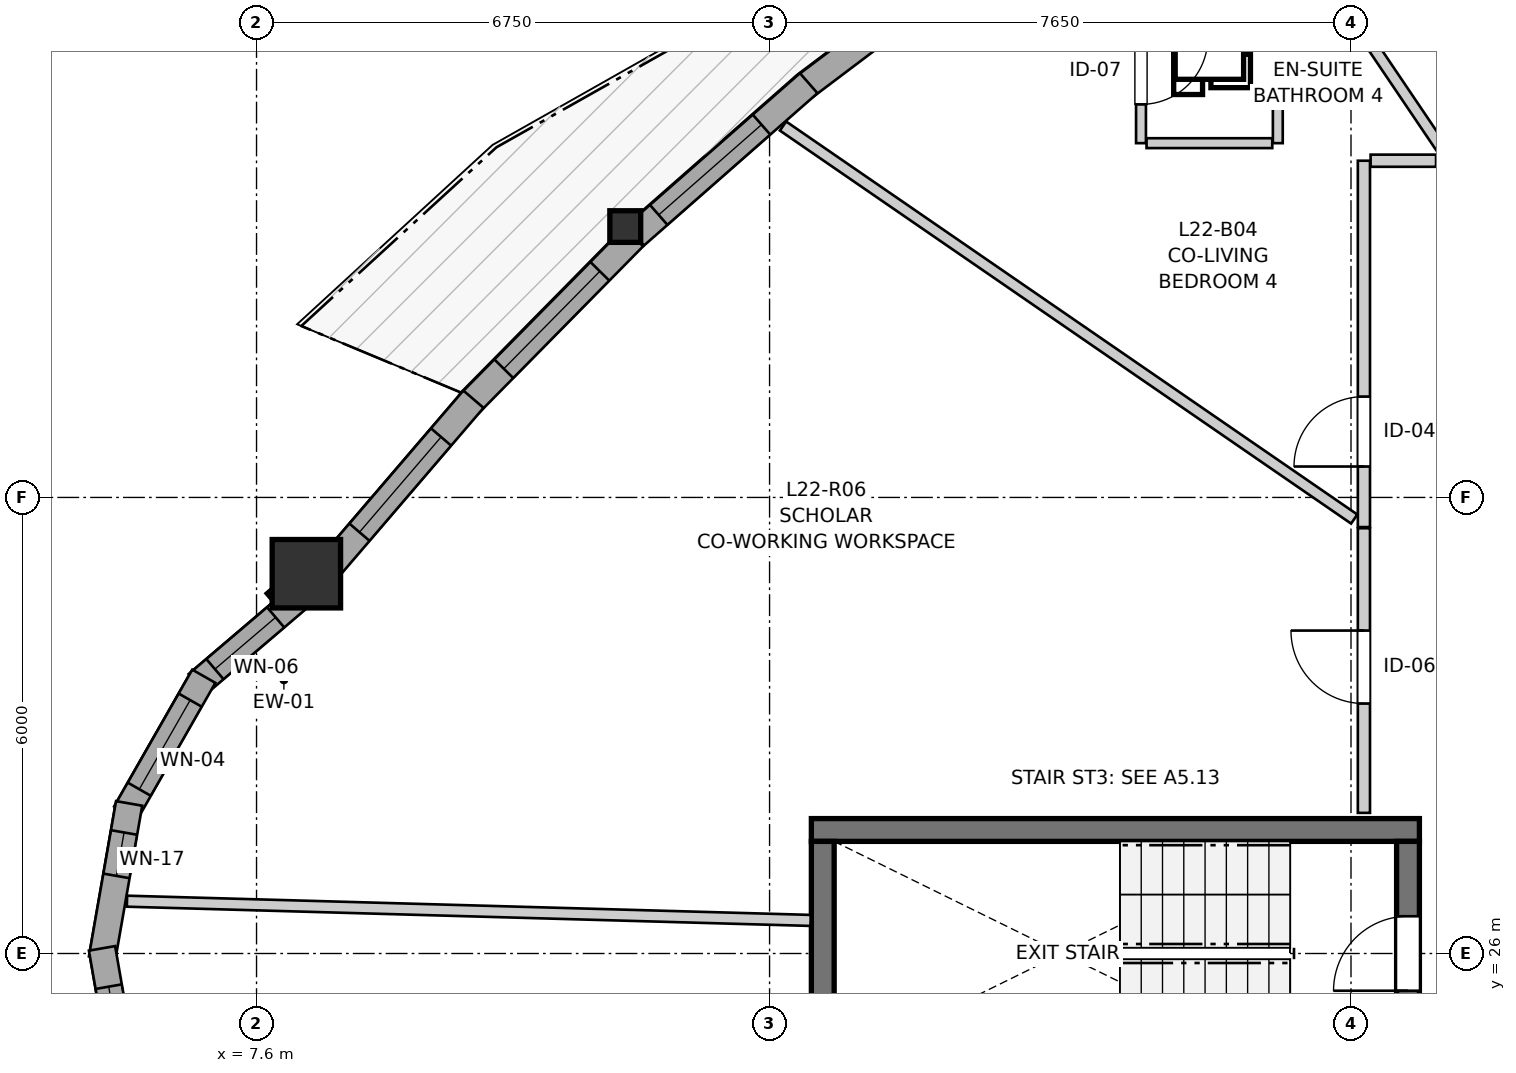
"""IFC4 building model, lengths in metres.
Left out: names, types, materials, properties, quantities, classifications, styles, units other than length and angle.
Written with IfcOpenShell. Run it as: python <this file> out.ifc"""

import sys

from ifc_helpers import new_model, si_unit, direction, frame, frame_2d, origin, origin_2d, place, context, subcontext, project, spatial, rectangle, i_section, extrude, source, transform, mapped, element, fill, save


model = new_model("IFC4")
c1 = context("Model", 3, precision=1e-05, world=origin(), true_north=direction((0.0, 1.0)))
c2 = subcontext(c1, "Body", "Model", "MODEL_VIEW")
j1 = project(units=[si_unit("LENGTHUNIT", "METRE"), si_unit("PLANEANGLEUNIT", "RADIAN")], contexts=[c1])
p1 = place(None, origin())
s1 = spatial("IfcSite", under=j1, at=p1, CompositionType="ELEMENT")
p2 = place(p1, origin())
s2 = spatial("IfcBuilding", under=s1, at=p2, CompositionType="ELEMENT")
p3 = place(p2, frame((0.0, 0.0, 76.8)))
s3 = spatial("IfcBuildingStorey", under=s2, at=p3, CompositionType="ELEMENT", Elevation=76.8)
p4 = place(p3, frame((22.9, 27.625, 0.0), z_axis=(0.0, 0.0, 1.0), x_axis=(-1.0, 0.0, 0.0)))
e1 = element("IfcWall", 1, at=p4, inside=s3, PredefinedType="SHEAR", context=c2, shape_type="SweptSolid", body=[
    extrude(rectangle(XDim=8.0, YDim=0.3, at=frame_2d((4.0, 0.0))), origin(), (0.0, 0.0, 1.0), 2.935),
])
p5 = place(p3, frame((15.05, 27.475, 0.0), z_axis=(0.0, 0.0, 1.0), x_axis=(0.0, -1.0, 0.0)))
e2 = element("IfcWall", 2, at=p5, inside=s3, PredefinedType="SHEAR", context=c2, shape_type="SweptSolid", body=[
    extrude(rectangle(XDim=2.95, YDim=0.3, at=frame_2d((1.475, 0.0))), origin(), (0.0, 0.0, 1.0), 2.935),
])
p6 = place(p3, frame((22.75, 24.525, 0.0), z_axis=(0.0, 0.0, 1.0), x_axis=(0.0, 1.0, 0.0)))
e3 = element("IfcWall", 3, at=p6, inside=s3, PredefinedType="SHEAR", context=c2, shape_type="SweptSolid", body=[
    extrude(rectangle(XDim=2.95, YDim=0.3, at=frame_2d((1.475, 0.0))), origin(), (0.0, 0.0, 1.0), 2.935),
])
p7 = place(p6, frame((0.985, 0.0, 0.0)))
e4 = element("IfcOpeningElement", 4, at=p7, cuts=e3, PredefinedType="OPENING", context=c2, shape_type="SweptSolid", body=[
    extrude(rectangle(XDim=0.98, YDim=2.15, at=frame_2d((0.49, 1.075))), frame((0.0, 0.16, 0.0), z_axis=(0.0, -1.0, 0.0), x_axis=(1.0, 0.0, 0.0)), (0.0, 0.0, 1.0), 0.32),
])
m1 = source(origin(), c2, "Body", "SweptSolid", [
    extrude(rectangle(XDim=0.9, YDim=0.9, at=origin_2d()), origin(), (0.0, 0.0, 1.0), 2.935),
])
p8 = place(p3, frame((8.256, 30.997, 0.0), z_axis=(0.0, 0.0, 1.0), x_axis=(1.0, 0.0, 0.0)))
e5 = element("IfcColumn", 5, at=p8, inside=s3, PredefinedType="COLUMN", context=c2, shape_type="MappedRepresentation", body=[
    mapped(m1, transform((0.0, 0.0, 0.0), x_axis=(1.0, 0.0, 0.0), y_axis=(0.0, 1.0, 0.0), z_axis=(0.0, 0.0, 1.0), scale=1.0)),
])
m2 = source(origin(), c2, "Body", "SweptSolid", [
    extrude(i_section(OverallWidth=0.406, OverallDepth=0.416, WebThickness=0.027, FlangeThickness=0.044, FilletRadius=0.015, at=origin_2d()), origin(), (0.0, 0.0, 1.0), 2.935),
])
p9 = place(p3, frame((12.451, 35.564, 0.0), z_axis=(0.0, 0.0, 1.0), x_axis=(1.0, 0.0, 0.0)))
e6 = element("IfcColumn", 6, at=p9, inside=s3, PredefinedType="PILASTER", context=c2, shape_type="MappedRepresentation", body=[
    mapped(m2, transform((0.0, 0.0, 0.0), x_axis=(1.0, 0.0, 0.0), y_axis=(0.0, 1.0, 0.0), z_axis=(0.0, 0.0, 1.0), scale=1.0)),
])
p10 = place(p3, frame((8.198, 30.717, 0.0), z_axis=(0.0, 0.0, 1.0), x_axis=(-0.761176639947, -0.648544618973, 0.0)))
e7 = element("IfcWall", 7, at=p10, inside=s3, PredefinedType="SOLIDWALL", context=c2, shape_type="SweptSolid", body=[
    extrude(rectangle(XDim=1.81, YDim=0.35, at=frame_2d((0.905, 0.0))), origin(), (0.0, 0.0, 1.0), 2.465),
])
p11 = place(p10, frame((0.455, 0.0, 0.82)))
e8 = element("IfcOpeningElement", 8, at=p11, cuts=e7, PredefinedType="OPENING", context=c2, shape_type="SweptSolid", body=[
    extrude(rectangle(XDim=1.05, YDim=1.45, at=frame_2d((0.525, 0.725))), frame((0.0, 0.185, 0.0), z_axis=(0.0, -1.0, 0.0), x_axis=(1.0, 0.0, 0.0)), (0.0, 0.0, 1.0), 0.37),
])
p12 = place(p3, frame((6.906, 29.647, 0.0), z_axis=(0.0, 0.0, 1.0), x_axis=(-0.496037473582, -0.868301114132, 0.0)))
e9 = element("IfcWall", 9, at=p12, inside=s3, PredefinedType="SOLIDWALL", context=c2, shape_type="SweptSolid", body=[
    extrude(rectangle(XDim=2.073, YDim=0.35, at=frame_2d((1.037, 0.0))), origin(), (0.0, 0.0, 1.0), 2.465),
])
p13 = place(p12, frame((0.362, 0.0, 0.82)))
e10 = element("IfcOpeningElement", 10, at=p13, cuts=e9, PredefinedType="OPENING", context=c2, shape_type="SweptSolid", body=[
    extrude(rectangle(XDim=1.35, YDim=1.45, at=frame_2d((0.675, 0.725))), frame((0.0, 0.185, 0.0), z_axis=(0.0, -1.0, 0.0), x_axis=(1.0, 0.0, 0.0)), (0.0, 0.0, 1.0), 0.37),
])
p14 = place(p3, frame((5.924, 27.975, 0.0), z_axis=(0.0, 0.0, 1.0), x_axis=(-0.172166087538, -0.985067935881, 0.0)))
e11 = element("IfcWall", 11, at=p14, inside=s3, PredefinedType="SOLIDWALL", context=c2, shape_type="SweptSolid", body=[
    extrude(rectangle(XDim=2.073, YDim=0.35, at=frame_2d((1.037, 0.0))), origin(), (0.0, 0.0, 1.0), 2.465),
])
p15 = place(p14, frame((0.388, 0.0, 0.82)))
e12 = element("IfcOpeningElement", 12, at=p15, cuts=e11, PredefinedType="OPENING", context=c2, shape_type="SweptSolid", body=[
    extrude(rectangle(XDim=0.58, YDim=1.35, at=frame_2d((0.29, 0.675))), frame((0.0, 0.185, 0.0), z_axis=(0.0, -1.0, 0.0), x_axis=(1.0, 0.0, 0.0)), (0.0, 0.0, 1.0), 0.37),
])
p16 = place(p3, frame((5.567, 26.068, 0.0), z_axis=(0.0, 0.0, 1.0), x_axis=(0.172166087538, -0.985067935881, 0.0)))
e13 = element("IfcWall", 13, at=p16, inside=s3, PredefinedType="SOLIDWALL", context=c2, shape_type="SweptSolid", body=[
    extrude(rectangle(XDim=2.073, YDim=0.35, at=frame_2d((1.037, 0.0))), origin(), (0.0, 0.0, 1.0), 2.465),
])
p17 = place(p16, frame((0.511, 0.0, 0.82)))
e14 = element("IfcOpeningElement", 14, at=p17, cuts=e13, PredefinedType="OPENING", context=c2, shape_type="SweptSolid", body=[
    extrude(rectangle(XDim=1.05, YDim=1.45, at=frame_2d((0.525, 0.725))), frame((0.0, 0.185, 0.0), z_axis=(0.0, -1.0, 0.0), x_axis=(1.0, 0.0, 0.0)), (0.0, 0.0, 1.0), 0.37),
])
p18 = place(p3, frame((17.031, 39.079, 0.0), z_axis=(0.0, 0.0, 1.0), x_axis=(-0.798385341516, -0.602146864521, 0.0)))
e15 = element("IfcWall", 15, at=p18, inside=s3, PredefinedType="SOLIDWALL", context=c2, shape_type="SweptSolid", body=[
    extrude(rectangle(XDim=2.799, YDim=0.35, at=frame_2d((1.4, 0.0))), origin(), (0.0, 0.0, 1.0), 2.465),
])
p19 = place(p3, frame((14.865, 37.45, 0.0), z_axis=(0.0, 0.0, 1.0), x_axis=(-0.751505335107, -0.659727012715, 0.0)))
e16 = element("IfcWall", 16, at=p19, inside=s3, PredefinedType="SOLIDWALL", context=c2, shape_type="SweptSolid", body=[
    extrude(rectangle(XDim=3.038, YDim=0.35, at=frame_2d((1.519, 0.0))), origin(), (0.0, 0.0, 1.0), 2.465),
])
p20 = place(p19, frame((0.826, 0.0, 0.82)))
e17 = element("IfcOpeningElement", 17, at=p20, cuts=e16, PredefinedType="OPENING", context=c2, shape_type="SweptSolid", body=[
    extrude(rectangle(XDim=1.8, YDim=1.45, at=frame_2d((0.9, 0.725))), frame((0.0, 0.185, 0.0), z_axis=(0.0, -1.0, 0.0), x_axis=(1.0, 0.0, 0.0)), (0.0, 0.0, 1.0), 0.37),
])
p21 = place(p3, frame((12.562, 35.427, 0.0), z_axis=(0.0, 0.0, 1.0), x_axis=(-0.701949387032, -0.712226830473, 0.0)))
e18 = element("IfcWall", 18, at=p21, inside=s3, PredefinedType="SOLIDWALL", context=c2, shape_type="SweptSolid", body=[
    extrude(rectangle(XDim=3.088, YDim=0.35, at=frame_2d((1.544, 0.0))), origin(), (0.0, 0.0, 1.0), 2.465),
])
p22 = place(p21, frame((0.634, 0.0, 0.82)))
e19 = element("IfcOpeningElement", 19, at=p22, cuts=e18, PredefinedType="OPENING", context=c2, shape_type="SweptSolid", body=[
    extrude(rectangle(XDim=1.8, YDim=1.45, at=frame_2d((0.9, 0.725))), frame((0.0, 0.185, 0.0), z_axis=(0.0, -1.0, 0.0), x_axis=(1.0, 0.0, 0.0)), (0.0, 0.0, 1.0), 0.37),
])
p23 = place(p3, frame((10.454, 33.292, 0.0), z_axis=(0.0, 0.0, 1.0), x_axis=(-0.650791373456, -0.759256602365, 0.0)))
e20 = element("IfcWall", 20, at=p23, inside=s3, PredefinedType="SOLIDWALL", context=c2, shape_type="SweptSolid", body=[
    extrude(rectangle(XDim=2.949, YDim=0.35, at=frame_2d((1.474, 0.0))), origin(), (0.0, 0.0, 1.0), 2.465),
])
p24 = place(p23, frame((0.654, 0.0, 0.82)))
e21 = element("IfcOpeningElement", 21, at=p24, cuts=e20, PredefinedType="OPENING", context=c2, shape_type="SweptSolid", body=[
    extrude(rectangle(XDim=1.65, YDim=1.45, at=frame_2d((0.825, 0.725))), frame((0.0, 0.185, 0.0), z_axis=(0.0, -1.0, 0.0), x_axis=(1.0, 0.0, 0.0)), (0.0, 0.0, 1.0), 0.37),
])
p25 = place(p3, frame((22.17, 31.61, 0.0), z_axis=(0.0, 0.0, 1.0), x_axis=(0.0, 1.0, 0.0)))
e22 = element("IfcWall", 22, at=p25, inside=s3, PredefinedType="PARTITIONING", context=c2, shape_type="SweptSolid", body=[
    extrude(rectangle(XDim=4.82, YDim=0.16, at=frame_2d((2.41, 0.0))), origin(), (0.0, 0.0, 1.0), 2.935),
])
p26 = place(p25, frame((0.797, 0.0, 0.0)))
e23 = element("IfcOpeningElement", 23, at=p26, cuts=e22, PredefinedType="OPENING", context=c2, shape_type="SweptSolid", body=[
    extrude(rectangle(XDim=0.92, YDim=2.1, at=frame_2d((0.46, 1.05))), frame((0.0, 0.09, 0.0), z_axis=(0.0, -1.0, 0.0), x_axis=(1.0, 0.0, 0.0)), (0.0, 0.0, 1.0), 0.18),
])
p27 = place(p3, frame((22.17, 27.85, 0.0), z_axis=(0.0, 0.0, 1.0), x_axis=(0.0, 1.0, 0.0)))
e24 = element("IfcWall", 24, at=p27, inside=s3, PredefinedType="PARTITIONING", context=c2, shape_type="SweptSolid", body=[
    extrude(rectangle(XDim=3.745, YDim=0.16, at=frame_2d((1.873, 0.0))), origin(), (0.0, 0.0, 1.0), 2.935),
])
p28 = place(p27, frame((1.438, 0.0, 0.0)))
e25 = element("IfcOpeningElement", 25, at=p28, cuts=e24, PredefinedType="OPENING", context=c2, shape_type="SweptSolid", body=[
    extrude(rectangle(XDim=0.96, YDim=2.1, at=frame_2d((0.48, 1.05))), frame((0.0, 0.09, 0.0), z_axis=(0.0, -1.0, 0.0), x_axis=(1.0, 0.0, 0.0)), (0.0, 0.0, 1.0), 0.18),
])
p29 = place(p3, frame((19.237, 38.561, 0.0), z_axis=(0.0, 0.0, 1.0), x_axis=(0.0, -1.0, 0.0)))
e26 = element("IfcWall", 26, at=p29, inside=s3, PredefinedType="PARTITIONING", context=c2, shape_type="SweptSolid", body=[
    extrude(rectangle(XDim=1.9, YDim=0.13, at=frame_2d((0.95, 0.0))), origin(), (0.0, 0.0, 1.0), 2.935),
])
p30 = place(p29, frame((0.51, 0.0, 0.0)))
e27 = element("IfcOpeningElement", 27, at=p30, cuts=e26, PredefinedType="OPENING", context=c2, shape_type="SweptSolid", body=[
    extrude(rectangle(XDim=0.88, YDim=2.05, at=frame_2d((0.44, 1.025))), frame((0.0, 0.075, 0.0), z_axis=(0.0, -1.0, 0.0), x_axis=(1.0, 0.0, 0.0)), (0.0, 0.0, 1.0), 0.15),
])
p31 = place(p3, frame((14.527, 36.886, 0.0), z_axis=(0.0, 0.0, 1.0), x_axis=(0.823849772282, -0.566808215106, 0.0)))
e28 = element("IfcWall", 28, at=p31, inside=s3, PredefinedType="PARTITIONING", context=c2, shape_type="SweptSolid", body=[
    extrude(rectangle(XDim=9.122, YDim=0.145, at=frame_2d((4.561, 0.0))), origin(), (0.0, 0.0, 1.0), 2.103),
])
p32 = place(p3, frame((5.896, 26.688, 0.0), z_axis=(0.0, 0.0, 1.0), x_axis=(0.999604843423, -0.028109731489, 0.0)))
e29 = element("IfcWall", 29, at=p32, inside=s3, PredefinedType="PARTITIONING", context=c2, shape_type="SweptSolid", body=[
    extrude(rectangle(XDim=8.998, YDim=0.145, at=frame_2d((4.499, 0.0))), origin(), (0.0, 0.0, 1.0), 2.935),
])
p33 = place(p3, frame((20.277, 40.906, 0.0), z_axis=(0.0, 0.0, 1.0), x_axis=(0.559905741259, -0.828556311246, 0.0)))
e30 = element("IfcWall", 30, at=p33, inside=s3, PredefinedType="PARTITIONING", context=c2, shape_type="SweptSolid", body=[
    extrude(rectangle(XDim=5.249, YDim=0.145, at=frame_2d((2.625, 0.0))), origin(), (0.0, 0.0, 1.0), 2.935),
])
p34 = place(p3, frame((21.037, 36.661, 0.0), z_axis=(0.0, 0.0, 1.0), x_axis=(0.0, 1.0, 0.0)))
e31 = element("IfcWall", 31, at=p34, inside=s3, PredefinedType="PARTITIONING", context=c2, shape_type="SweptSolid", body=[
    extrude(rectangle(XDim=1.9, YDim=0.13, at=frame_2d((0.95, 0.0))), origin(), (0.0, 0.0, 1.0), 2.935),
])
p35 = place(p3, frame((19.31, 36.661, 0.0), z_axis=(0.0, 0.0, 1.0), x_axis=(1.0, 0.0, 0.0)))
e32 = element("IfcWall", 32, at=p35, inside=s3, PredefinedType="PARTITIONING", context=c2, shape_type="SweptSolid", body=[
    extrude(rectangle(XDim=1.654, YDim=0.13, at=frame_2d((0.827, 0.0))), origin(), (0.0, 0.0, 1.0), 2.935),
])
p36 = place(p3, frame((22.258, 36.43, 0.0), z_axis=(0.0, 0.0, 1.0), x_axis=(1.0, 0.0, 0.0)))
e33 = element("IfcWall", 33, at=p36, inside=s3, PredefinedType="PARTITIONING", context=c2, shape_type="SweptSolid", body=[
    extrude(rectangle(XDim=0.861, YDim=0.16, at=frame_2d((0.431, 0.0))), origin(), (0.0, 0.0, 1.0), 2.935),
])
m3 = source(origin(), c2, "Body", "SweptSolid", [
    extrude(rectangle(XDim=1.05, YDim=1.45, at=frame_2d((0.525, 0.725))), frame((0.0, 0.03, 0.0), z_axis=(0.0, -1.0, 0.0), x_axis=(1.0, 0.0, 0.0)), (0.0, 0.0, 1.0), 0.06),
])
p37 = place(p11, origin())
e34 = element("IfcWindow", 34, at=p37, inside=s3, PartitioningType="SINGLE_PANEL", PredefinedType="WINDOW", context=c2, shape_type="MappedRepresentation", body=[
    mapped(m3, transform((0.0, 0.0, 0.0), x_axis=(1.0, 0.0, 0.0), y_axis=(0.0, 1.0, 0.0), z_axis=(0.0, 0.0, 1.0), scale=1.0)),
])
fill(e8, e34)
m4 = source(origin(), c2, "Body", "SweptSolid", [
    extrude(rectangle(XDim=1.35, YDim=1.45, at=frame_2d((0.675, 0.725))), frame((0.0, 0.03, 0.0), z_axis=(0.0, -1.0, 0.0), x_axis=(1.0, 0.0, 0.0)), (0.0, 0.0, 1.0), 0.06),
])
p38 = place(p13, origin())
e35 = element("IfcWindow", 35, at=p38, inside=s3, PartitioningType="SINGLE_PANEL", PredefinedType="WINDOW", context=c2, shape_type="MappedRepresentation", body=[
    mapped(m4, transform((0.0, 0.0, 0.0), x_axis=(1.0, 0.0, 0.0), y_axis=(0.0, 1.0, 0.0), z_axis=(0.0, 0.0, 1.0), scale=1.0)),
])
fill(e10, e35)
m5 = source(origin(), c2, "Body", "SweptSolid", [
    extrude(rectangle(XDim=0.58, YDim=1.35, at=frame_2d((0.29, 0.675))), frame((0.0, 0.03, 0.0), z_axis=(0.0, -1.0, 0.0), x_axis=(1.0, 0.0, 0.0)), (0.0, 0.0, 1.0), 0.06),
])
p39 = place(p15, origin())
e36 = element("IfcWindow", 36, at=p39, inside=s3, PartitioningType="SINGLE_PANEL", PredefinedType="WINDOW", context=c2, shape_type="MappedRepresentation", body=[
    mapped(m5, transform((0.0, 0.0, 0.0), x_axis=(1.0, 0.0, 0.0), y_axis=(0.0, 1.0, 0.0), z_axis=(0.0, 0.0, 1.0), scale=1.0)),
])
fill(e12, e36)
p40 = place(p17, origin())
e37 = element("IfcWindow", 37, at=p40, inside=s3, PartitioningType="SINGLE_PANEL", PredefinedType="WINDOW", context=c2, shape_type="MappedRepresentation", body=[
    mapped(m3, transform((0.0, 0.0, 0.0), x_axis=(1.0, 0.0, 0.0), y_axis=(0.0, 1.0, 0.0), z_axis=(0.0, 0.0, 1.0), scale=1.0)),
])
fill(e14, e37)
m6 = source(origin(), c2, "Body", "SweptSolid", [
    extrude(rectangle(XDim=1.8, YDim=1.45, at=frame_2d((0.9, 0.725))), frame((0.0, 0.03, 0.0), z_axis=(0.0, -1.0, 0.0), x_axis=(1.0, 0.0, 0.0)), (0.0, 0.0, 1.0), 0.06),
])
p41 = place(p20, origin())
e38 = element("IfcWindow", 38, at=p41, inside=s3, PartitioningType="SINGLE_PANEL", PredefinedType="WINDOW", context=c2, shape_type="MappedRepresentation", body=[
    mapped(m6, transform((0.0, 0.0, 0.0), x_axis=(1.0, 0.0, 0.0), y_axis=(0.0, 1.0, 0.0), z_axis=(0.0, 0.0, 1.0), scale=1.0)),
])
fill(e17, e38)
p42 = place(p22, origin())
e39 = element("IfcWindow", 39, at=p42, inside=s3, PartitioningType="SINGLE_PANEL", PredefinedType="WINDOW", context=c2, shape_type="MappedRepresentation", body=[
    mapped(m6, transform((0.0, 0.0, 0.0), x_axis=(1.0, 0.0, 0.0), y_axis=(0.0, 1.0, 0.0), z_axis=(0.0, 0.0, 1.0), scale=1.0)),
])
fill(e19, e39)
m7 = source(origin(), c2, "Body", "SweptSolid", [
    extrude(rectangle(XDim=1.65, YDim=1.45, at=frame_2d((0.825, 0.725))), frame((0.0, 0.03, 0.0), z_axis=(0.0, -1.0, 0.0), x_axis=(1.0, 0.0, 0.0)), (0.0, 0.0, 1.0), 0.06),
])
p43 = place(p24, origin())
e40 = element("IfcWindow", 40, at=p43, inside=s3, PartitioningType="SINGLE_PANEL", PredefinedType="WINDOW", context=c2, shape_type="MappedRepresentation", body=[
    mapped(m7, transform((0.0, 0.0, 0.0), x_axis=(1.0, 0.0, 0.0), y_axis=(0.0, 1.0, 0.0), z_axis=(0.0, 0.0, 1.0), scale=1.0)),
])
fill(e21, e40)
m8 = source(origin(), c2, "Body", "SweptSolid", [
    extrude(rectangle(XDim=0.98, YDim=2.15, at=frame_2d((0.49, 1.075))), frame((0.0, 0.025, 0.0), z_axis=(0.0, -1.0, 0.0), x_axis=(1.0, 0.0, 0.0)), (0.0, 0.0, 1.0), 0.05),
])
p44 = place(p7, origin())
e41 = element("IfcDoor", 41, at=p44, inside=s3, OperationType="SINGLE_SWING_LEFT", PredefinedType="DOOR", context=c2, shape_type="MappedRepresentation", body=[
    mapped(m8, transform((0.0, 0.0, 0.0), x_axis=(1.0, 0.0, 0.0), y_axis=(0.0, 1.0, 0.0), z_axis=(0.0, 0.0, 1.0), scale=1.0)),
])
fill(e4, e41)
m9 = source(origin(), c2, "Body", "SweptSolid", [
    extrude(rectangle(XDim=0.92, YDim=2.1, at=frame_2d((0.46, 1.05))), frame((0.0, 0.025, 0.0), z_axis=(0.0, -1.0, 0.0), x_axis=(1.0, 0.0, 0.0)), (0.0, 0.0, 1.0), 0.05),
])
p45 = place(p26, origin())
e42 = element("IfcDoor", 42, at=p45, inside=s3, OperationType="SINGLE_SWING_LEFT", PredefinedType="DOOR", context=c2, shape_type="MappedRepresentation", body=[
    mapped(m9, transform((0.0, 0.0, 0.0), x_axis=(1.0, 0.0, 0.0), y_axis=(0.0, 1.0, 0.0), z_axis=(0.0, 0.0, 1.0), scale=1.0)),
])
fill(e23, e42)
m10 = source(origin(), c2, "Body", "SweptSolid", [
    extrude(rectangle(XDim=0.96, YDim=2.1, at=frame_2d((0.48, 1.05))), frame((0.0, 0.025, 0.0), z_axis=(0.0, -1.0, 0.0), x_axis=(1.0, 0.0, 0.0)), (0.0, 0.0, 1.0), 0.05),
])
p46 = place(p28, origin())
e43 = element("IfcDoor", 43, at=p46, inside=s3, OperationType="SINGLE_SWING_RIGHT", PredefinedType="DOOR", context=c2, shape_type="MappedRepresentation", body=[
    mapped(m10, transform((0.0, 0.0, 0.0), x_axis=(1.0, 0.0, 0.0), y_axis=(0.0, 1.0, 0.0), z_axis=(0.0, 0.0, 1.0), scale=1.0)),
])
fill(e25, e43)
m11 = source(origin(), c2, "Body", "SweptSolid", [
    extrude(rectangle(XDim=0.88, YDim=2.05, at=frame_2d((0.44, 1.025))), frame((0.0, 0.025, 0.0), z_axis=(0.0, -1.0, 0.0), x_axis=(1.0, 0.0, 0.0)), (0.0, 0.0, 1.0), 0.05),
])
p47 = place(p30, origin())
e44 = element("IfcDoor", 44, at=p47, inside=s3, OperationType="SINGLE_SWING_LEFT", PredefinedType="DOOR", context=c2, shape_type="MappedRepresentation", body=[
    mapped(m11, transform((0.0, 0.0, 0.0), x_axis=(1.0, 0.0, 0.0), y_axis=(0.0, 1.0, 0.0), z_axis=(0.0, 0.0, 1.0), scale=1.0)),
])
fill(e27, e44)
save(model, sys.argv[1])
